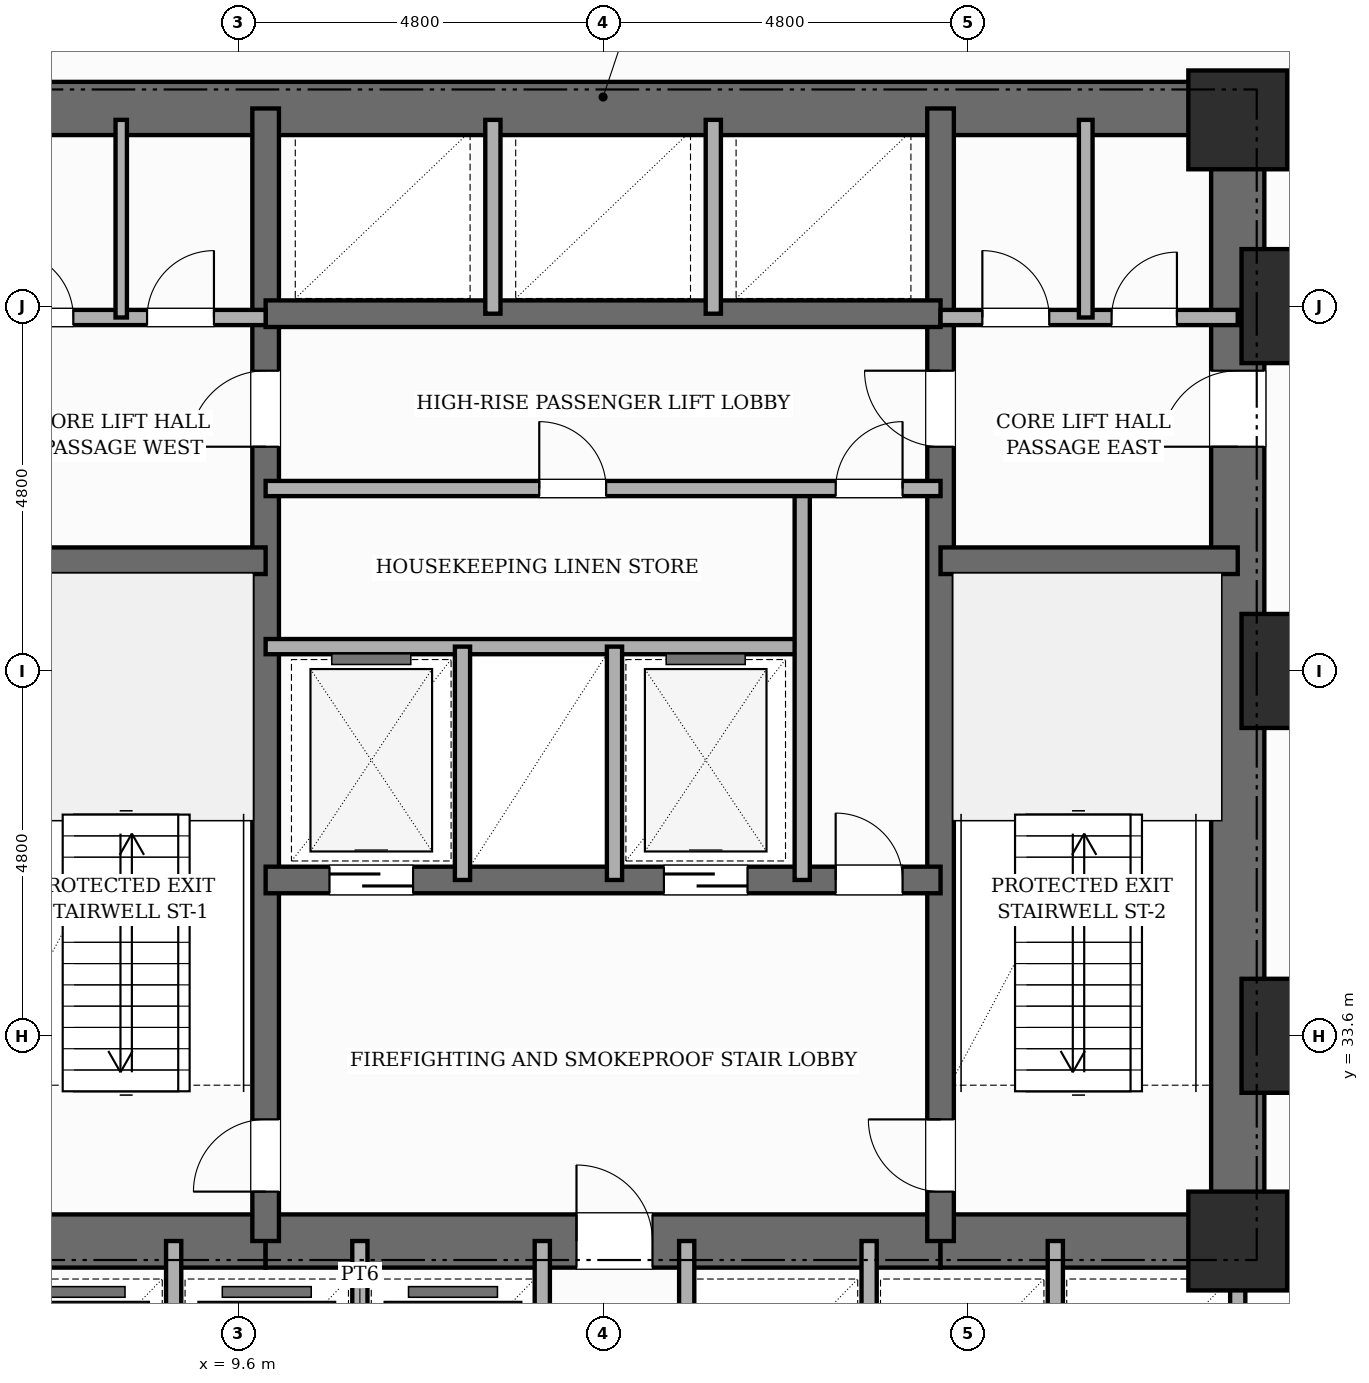
"""IFC4 building model, lengths in metres.
Left out: names, types, materials, properties, quantities, classifications, styles, units other than length and angle.
Written with IfcOpenShell. Run it as: python <this file> out.ifc"""

import sys

from ifc_helpers import new_model, si_unit, direction, frame, frame_2d, origin, origin_2d, place, context, subcontext, project, spatial, rectangle, extrude, element, fill, save


model = new_model("IFC4")
c1 = context("Model", 3, precision=1e-05, world=origin(), true_north=direction((0.0, 1.0)))
c2 = subcontext(c1, "Body", "Model", "MODEL_VIEW")
j1 = project(units=[si_unit("LENGTHUNIT", "METRE"), si_unit("PLANEANGLEUNIT", "RADIAN")], contexts=[c1])
p1 = place(None, origin())
s1 = spatial("IfcSite", under=j1, at=p1, CompositionType="ELEMENT")
p2 = place(p1, origin())
s2 = spatial("IfcBuilding", under=s1, at=p2, CompositionType="ELEMENT")
p3 = place(p2, frame((0.0, 0.0, 10.0)))
s3 = spatial("IfcBuildingStorey", under=s2, at=p3, CompositionType="ELEMENT", Elevation=10.0)
p4 = place(p3, frame((22.75, 30.55, 0.0), z_axis=(0.0, 0.0, 1.0), x_axis=(0.0, 1.0, 0.0)))
e1 = element("IfcWall", 1, at=p4, inside=s3, PredefinedType="SHEAR", context=c2, shape_type="SweptSolid", body=[
    extrude(rectangle(XDim=15.6, YDim=0.7, at=frame_2d((7.8, 0.0))), origin(), (0.0, 0.0, 1.0), 4.8),
])
p5 = place(p4, frame((10.8, 0.0, 0.0)))
e2 = element("IfcOpeningElement", 2, at=p5, cuts=e1, PredefinedType="OPENING", context=c2, shape_type="SweptSolid", body=[
    extrude(rectangle(XDim=1.0, YDim=2.15, at=frame_2d((0.5, 1.075))), frame((0.0, 0.36, 0.0), z_axis=(0.0, -1.0, 0.0), x_axis=(1.0, 0.0, 0.0)), (0.0, 0.0, 1.0), 0.72),
])
p6 = place(p3, frame((6.05, 45.8, 0.0), z_axis=(0.0, 0.0, 1.0), x_axis=(1.0, 0.0, 0.0)))
e3 = element("IfcWall", 3, at=p6, inside=s3, PredefinedType="SHEAR", context=c2, shape_type="SweptSolid", body=[
    extrude(rectangle(XDim=16.7, YDim=0.7, at=frame_2d((8.35, 0.0))), origin(), (0.0, 0.0, 1.0), 4.8),
])
p7 = place(p3, frame((6.05, 30.9, 0.0), z_axis=(0.0, 0.0, 1.0), x_axis=(1.0, 0.0, 0.0)))
e4 = element("IfcWall", 4, at=p7, inside=s3, PredefinedType="SHEAR", context=c2, shape_type="SweptSolid", body=[
    extrude(rectangle(XDim=3.91, YDim=0.7, at=frame_2d((1.955, 0.0))), origin(), (0.0, 0.0, 1.0), 4.8),
])
p8 = place(p3, frame((9.96, 30.9, 0.0), z_axis=(0.0, 0.0, 1.0), x_axis=(1.0, 0.0, 0.0)))
e5 = element("IfcWall", 5, at=p8, inside=s3, PredefinedType="SHEAR", context=c2, shape_type="SweptSolid", body=[
    extrude(rectangle(XDim=8.88, YDim=0.7, at=frame_2d((4.44, 0.0))), origin(), (0.0, 0.0, 1.0), 4.8),
])
p9 = place(p8, frame((4.09, 0.0, 0.0)))
e6 = element("IfcOpeningElement", 6, at=p9, cuts=e5, PredefinedType="OPENING", context=c2, shape_type="SweptSolid", body=[
    extrude(rectangle(XDim=1.0, YDim=2.15, at=frame_2d((0.5, 1.075))), frame((0.0, 0.36, 0.0), z_axis=(0.0, -1.0, 0.0), x_axis=(1.0, 0.0, 0.0)), (0.0, 0.0, 1.0), 0.72),
])
p10 = place(p3, frame((18.84, 30.9, 0.0), z_axis=(0.0, 0.0, 1.0), x_axis=(1.0, 0.0, 0.0)))
e7 = element("IfcWall", 7, at=p10, inside=s3, PredefinedType="SHEAR", context=c2, shape_type="SweptSolid", body=[
    extrude(rectangle(XDim=3.91, YDim=0.7, at=frame_2d((1.955, 0.0))), origin(), (0.0, 0.0, 1.0), 4.8),
])
p11 = place(p3, frame((9.96, 30.9, 0.0), z_axis=(0.0, 0.0, 1.0), x_axis=(0.0, 1.0, 0.0)))
e8 = element("IfcWall", 8, at=p11, inside=s3, PredefinedType="SHEAR", context=c2, shape_type="SweptSolid", body=[
    extrude(rectangle(XDim=14.9, YDim=0.35, at=frame_2d((7.45, 0.0))), origin(), (0.0, 0.0, 1.0), 4.8),
])
p12 = place(p11, frame((0.65, 0.0, 0.0)))
e9 = element("IfcOpeningElement", 9, at=p12, cuts=e8, PredefinedType="OPENING", context=c2, shape_type="SweptSolid", body=[
    extrude(rectangle(XDim=0.95, YDim=2.1, at=frame_2d((0.475, 1.05))), frame((0.0, 0.185, 0.0), z_axis=(0.0, -1.0, 0.0), x_axis=(1.0, 0.0, 0.0)), (0.0, 0.0, 1.0), 0.37),
])
p13 = place(p11, frame((10.45, 0.0, 0.0)))
e10 = element("IfcOpeningElement", 10, at=p13, cuts=e8, PredefinedType="OPENING", context=c2, shape_type="SweptSolid", body=[
    extrude(rectangle(XDim=1.0, YDim=2.15, at=frame_2d((0.5, 1.075))), frame((0.0, 0.185, 0.0), z_axis=(0.0, -1.0, 0.0), x_axis=(1.0, 0.0, 0.0)), (0.0, 0.0, 1.0), 0.37),
])
p14 = place(p3, frame((18.84, 30.9, 0.0), z_axis=(0.0, 0.0, 1.0), x_axis=(0.0, 1.0, 0.0)))
e11 = element("IfcWall", 11, at=p14, inside=s3, PredefinedType="SHEAR", context=c2, shape_type="SweptSolid", body=[
    extrude(rectangle(XDim=14.9, YDim=0.35, at=frame_2d((7.45, 0.0))), origin(), (0.0, 0.0, 1.0), 4.8),
])
p15 = place(p14, frame((0.65, 0.0, 0.0)))
e12 = element("IfcOpeningElement", 12, at=p15, cuts=e11, PredefinedType="OPENING", context=c2, shape_type="SweptSolid", body=[
    extrude(rectangle(XDim=0.95, YDim=2.1, at=frame_2d((0.475, 1.05))), frame((0.0, 0.185, 0.0), z_axis=(0.0, -1.0, 0.0), x_axis=(1.0, 0.0, 0.0)), (0.0, 0.0, 1.0), 0.37),
])
p16 = place(p14, frame((10.45, 0.0, 0.0)))
e13 = element("IfcOpeningElement", 13, at=p16, cuts=e11, PredefinedType="OPENING", context=c2, shape_type="SweptSolid", body=[
    extrude(rectangle(XDim=1.0, YDim=2.15, at=frame_2d((0.5, 1.075))), frame((0.0, 0.185, 0.0), z_axis=(0.0, -1.0, 0.0), x_axis=(1.0, 0.0, 0.0)), (0.0, 0.0, 1.0), 0.37),
])
for number, where, z_axis, x_axis in (
    (14, (6.05, 39.85, 0.0), (0.0, 0.0, 1.0), (1.0, 0.0, 0.0)),
    (15, (18.84, 39.85, 0.0), (0.0, 0.0, 1.0), (1.0, 0.0, 0.0)),
):
    element("IfcWall", number, at=place(p3, frame(where, z_axis=z_axis, x_axis=x_axis)), inside=s3, PredefinedType="SHEAR", context=c2, shape_type="SweptSolid", body=[
        extrude(rectangle(XDim=3.91, YDim=0.35, at=frame_2d((1.955, 0.0))), origin(), (0.0, 0.0, 1.0), 4.8),
    ])
p17 = place(p3, frame((9.96, 35.65, 0.0), z_axis=(0.0, 0.0, 1.0), x_axis=(1.0, 0.0, 0.0)))
e16 = element("IfcWall", 16, at=p17, inside=s3, PredefinedType="SHEAR", context=c2, shape_type="SweptSolid", body=[
    extrude(rectangle(XDim=8.88, YDim=0.35, at=frame_2d((4.44, 0.0))), origin(), (0.0, 0.0, 1.0), 4.8),
])
p18 = place(p17, frame((0.84, 0.0, 0.0)))
e17 = element("IfcOpeningElement", 17, at=p18, cuts=e16, PredefinedType="OPENING", context=c2, shape_type="SweptSolid", body=[
    extrude(rectangle(XDim=1.1, YDim=2.15, at=frame_2d((0.55, 1.075))), frame((0.0, 0.185, 0.0), z_axis=(0.0, -1.0, 0.0), x_axis=(1.0, 0.0, 0.0)), (0.0, 0.0, 1.0), 0.37),
])
p19 = place(p17, frame((5.24, 0.0, 0.0)))
e18 = element("IfcOpeningElement", 18, at=p19, cuts=e16, PredefinedType="OPENING", context=c2, shape_type="SweptSolid", body=[
    extrude(rectangle(XDim=1.1, YDim=2.15, at=frame_2d((0.55, 1.075))), frame((0.0, 0.185, 0.0), z_axis=(0.0, -1.0, 0.0), x_axis=(1.0, 0.0, 0.0)), (0.0, 0.0, 1.0), 0.37),
])
p20 = place(p17, frame((7.5, 0.0, 0.0)))
e19 = element("IfcOpeningElement", 19, at=p20, cuts=e16, PredefinedType="OPENING", context=c2, shape_type="SweptSolid", body=[
    extrude(rectangle(XDim=0.88, YDim=2.1, at=frame_2d((0.44, 1.05))), frame((0.0, 0.185, 0.0), z_axis=(0.0, -1.0, 0.0), x_axis=(1.0, 0.0, 0.0)), (0.0, 0.0, 1.0), 0.37),
])
p21 = place(p3, frame((9.96, 43.1, 0.0), z_axis=(0.0, 0.0, 1.0), x_axis=(1.0, 0.0, 0.0)))
e20 = element("IfcWall", 20, at=p21, inside=s3, PredefinedType="SHEAR", context=c2, shape_type="SweptSolid", body=[
    extrude(rectangle(XDim=8.88, YDim=0.35, at=frame_2d((4.44, 0.0))), origin(), (0.0, 0.0, 1.0), 4.8),
])
for number, where, z_axis, x_axis in (
    (21, (22.75, 30.9, 0.0), (0.0, 0.0, 1.0), (1.0, 0.0, 0.0)),
    (22, (22.75, 45.65, 0.0), (0.0, 0.0, 1.0), (1.0, 0.0, 0.0)),
):
    element("IfcColumn", number, at=place(p3, frame(where, z_axis=z_axis, x_axis=x_axis)), inside=s3, PredefinedType="COLUMN", context=c2, shape_type="SweptSolid", body=[
        extrude(rectangle(XDim=1.3, YDim=1.3, at=origin_2d()), origin(), (0.0, 0.0, 1.0), 4.8),
    ])
for number, where, z_axis, x_axis in (
    (23, (23.55, 33.6, 0.0), (0.0, 0.0, 1.0), (1.0, 0.0, 0.0)),
    (24, (23.55, 38.4, 0.0), (0.0, 0.0, 1.0), (1.0, 0.0, 0.0)),
    (25, (23.55, 43.2, 0.0), (0.0, 0.0, 1.0), (1.0, 0.0, 0.0)),
):
    element("IfcColumn", number, at=place(p3, frame(where, z_axis=z_axis, x_axis=x_axis)), inside=s3, PredefinedType="USERDEFINED", context=c2, shape_type="SweptSolid", body=[
        extrude(rectangle(XDim=1.5, YDim=1.5, at=origin_2d()), origin(), (0.0, 0.0, 1.0), 4.8),
    ])
p22 = place(p3, frame((9.96, 38.72, 0.0), z_axis=(0.0, 0.0, 1.0), x_axis=(1.0, 0.0, 0.0)))
e26 = element("IfcWall", 26, at=p22, inside=s3, PredefinedType="POLYGONAL", context=c2, shape_type="SweptSolid", body=[
    extrude(rectangle(XDim=7.06, YDim=0.2, at=frame_2d((3.53, 0.0))), origin(), (0.0, 0.0, 1.0), 4.4),
])
for number, where, z_axis, x_axis in (
    (27, (12.55, 35.65, 0.0), (0.0, 0.0, 1.0), (0.0, 1.0, 0.0)),
    (28, (14.55, 35.65, 0.0), (0.0, 0.0, 1.0), (0.0, 1.0, 0.0)),
):
    element("IfcWall", number, at=place(p3, frame(where, z_axis=z_axis, x_axis=x_axis)), inside=s3, PredefinedType="POLYGONAL", context=c2, shape_type="SweptSolid", body=[
        extrude(rectangle(XDim=3.07, YDim=0.2, at=frame_2d((1.535, 0.0))), origin(), (0.0, 0.0, 1.0), 4.4),
    ])
p23 = place(p3, frame((17.02, 35.65, 0.0), z_axis=(0.0, 0.0, 1.0), x_axis=(0.0, 1.0, 0.0)))
e29 = element("IfcWall", 29, at=p23, inside=s3, PredefinedType="POLYGONAL", context=c2, shape_type="SweptSolid", body=[
    extrude(rectangle(XDim=5.15, YDim=0.2, at=frame_2d((2.575, 0.0))), origin(), (0.0, 0.0, 1.0), 4.4),
])
p24 = place(p3, frame((9.96, 40.8, 0.0), z_axis=(0.0, 0.0, 1.0), x_axis=(1.0, 0.0, 0.0)))
e30 = element("IfcWall", 30, at=p24, inside=s3, PredefinedType="POLYGONAL", context=c2, shape_type="SweptSolid", body=[
    extrude(rectangle(XDim=8.88, YDim=0.2, at=frame_2d((4.44, 0.0))), origin(), (0.0, 0.0, 1.0), 4.4),
])
p25 = place(p24, frame((7.5, 0.0, 0.0)))
e31 = element("IfcOpeningElement", 31, at=p25, cuts=e30, PredefinedType="OPENING", context=c2, shape_type="SweptSolid", body=[
    extrude(rectangle(XDim=0.88, YDim=2.1, at=frame_2d((0.44, 1.05))), frame((0.0, 0.11, 0.0), z_axis=(0.0, -1.0, 0.0), x_axis=(1.0, 0.0, 0.0)), (0.0, 0.0, 1.0), 0.22),
])
p26 = place(p24, frame((3.6, 0.0, 0.0)))
e32 = element("IfcOpeningElement", 32, at=p26, cuts=e30, PredefinedType="OPENING", context=c2, shape_type="SweptSolid", body=[
    extrude(rectangle(XDim=0.88, YDim=2.1, at=frame_2d((0.44, 1.05))), frame((0.0, 0.11, 0.0), z_axis=(0.0, -1.0, 0.0), x_axis=(1.0, 0.0, 0.0)), (0.0, 0.0, 1.0), 0.22),
])
p27 = place(p3, frame((18.84, 43.05, 0.0), z_axis=(0.0, 0.0, 1.0), x_axis=(1.0, 0.0, 0.0)))
e33 = element("IfcWall", 33, at=p27, inside=s3, PredefinedType="POLYGONAL", context=c2, shape_type="SweptSolid", body=[
    extrude(rectangle(XDim=3.91, YDim=0.2, at=frame_2d((1.955, 0.0))), origin(), (0.0, 0.0, 1.0), 3.48),
])
p28 = place(p27, frame((0.55, 0.0, 0.0)))
e34 = element("IfcOpeningElement", 34, at=p28, cuts=e33, PredefinedType="OPENING", context=c2, shape_type="SweptSolid", body=[
    extrude(rectangle(XDim=0.88, YDim=2.1, at=frame_2d((0.44, 1.05))), frame((0.0, 0.11, 0.0), z_axis=(0.0, -1.0, 0.0), x_axis=(1.0, 0.0, 0.0)), (0.0, 0.0, 1.0), 0.22),
])
p29 = place(p27, frame((2.25, 0.0, 0.0)))
e35 = element("IfcOpeningElement", 35, at=p29, cuts=e33, PredefinedType="OPENING", context=c2, shape_type="SweptSolid", body=[
    extrude(rectangle(XDim=0.86, YDim=2.1, at=frame_2d((0.43, 1.05))), frame((0.0, 0.11, 0.0), z_axis=(0.0, -1.0, 0.0), x_axis=(1.0, 0.0, 0.0)), (0.0, 0.0, 1.0), 0.22),
])
p30 = place(p3, frame((6.05, 43.05, 0.0), z_axis=(0.0, 0.0, 1.0), x_axis=(1.0, 0.0, 0.0)))
e36 = element("IfcWall", 36, at=p30, inside=s3, PredefinedType="POLYGONAL", context=c2, shape_type="SweptSolid", body=[
    extrude(rectangle(XDim=3.91, YDim=0.2, at=frame_2d((1.955, 0.0))), origin(), (0.0, 0.0, 1.0), 3.48),
])
p31 = place(p30, frame((0.5, 0.0, 0.0)))
e37 = element("IfcOpeningElement", 37, at=p31, cuts=e36, PredefinedType="OPENING", context=c2, shape_type="SweptSolid", body=[
    extrude(rectangle(XDim=0.88, YDim=2.1, at=frame_2d((0.44, 1.05))), frame((0.0, 0.11, 0.0), z_axis=(0.0, -1.0, 0.0), x_axis=(1.0, 0.0, 0.0)), (0.0, 0.0, 1.0), 0.22),
])
p32 = place(p30, frame((2.35, 0.0, 0.0)))
e38 = element("IfcOpeningElement", 38, at=p32, cuts=e36, PredefinedType="OPENING", context=c2, shape_type="SweptSolid", body=[
    extrude(rectangle(XDim=0.88, YDim=2.1, at=frame_2d((0.44, 1.05))), frame((0.0, 0.11, 0.0), z_axis=(0.0, -1.0, 0.0), x_axis=(1.0, 0.0, 0.0)), (0.0, 0.0, 1.0), 0.22),
])
for number, where, z_axis, x_axis in (
    (39, (12.95, 43.1, 0.0), (0.0, 0.0, 1.0), (0.0, 1.0, 0.0)),
    (40, (15.85, 43.1, 0.0), (0.0, 0.0, 1.0), (0.0, 1.0, 0.0)),
):
    element("IfcWall", number, at=place(p3, frame(where, z_axis=z_axis, x_axis=x_axis)), inside=s3, PredefinedType="POLYGONAL", context=c2, shape_type="SweptSolid", body=[
        extrude(rectangle(XDim=2.55, YDim=0.2, at=frame_2d((1.275, 0.0))), origin(), (0.0, 0.0, 1.0), 4.4),
    ])
p33 = place(p3, frame((8.06, 43.05, 0.0), z_axis=(0.0, 0.0, 1.0), x_axis=(0.0, 1.0, 0.0)))
e41 = element("IfcWall", 41, at=p33, inside=s3, PredefinedType="PARTITIONING", context=c2, shape_type="SweptSolid", body=[
    extrude(rectangle(XDim=2.6, YDim=0.15, at=frame_2d((1.3, 0.0))), origin(), (0.0, 0.0, 1.0), 4.4),
])
p34 = place(p3, frame((20.75, 43.05, 0.0), z_axis=(0.0, 0.0, 1.0), x_axis=(0.0, 1.0, 0.0)))
e42 = element("IfcWall", 42, at=p34, inside=s3, PredefinedType="PLUMBINGWALL", context=c2, shape_type="SweptSolid", body=[
    extrude(rectangle(XDim=2.6, YDim=0.18, at=frame_2d((1.3, 0.0))), origin(), (0.0, 0.0, 1.0), 4.4),
])
p35 = place(p3, frame((22.75, 27.9, 0.0), z_axis=(0.0, 0.0, 1.0), x_axis=(0.0, 1.0, 0.0)))
e43 = element("IfcWall", 43, at=p35, inside=s3, PredefinedType="POLYGONAL", context=c2, shape_type="SweptSolid", body=[
    extrude(rectangle(XDim=3.0, YDim=0.2, at=frame_2d((1.5, 0.0))), origin(), (0.0, 0.0, 1.0), 4.4),
])
for number, where, z_axis, x_axis in (
    (44, (13.6, 28.0, 0.0), (0.0, 0.0, 1.0), (0.0, 1.0, 0.0)),
    (45, (15.5, 28.0, 0.0), (0.0, 0.0, 1.0), (0.0, 1.0, 0.0)),
    (46, (8.75, 28.0, 0.0), (0.0, 0.0, 1.0), (0.0, 1.0, 0.0)),
    (47, (11.2, 28.0, 0.0), (0.0, 0.0, 1.0), (0.0, 1.0, 0.0)),
    (48, (17.9, 28.0, 0.0), (0.0, 0.0, 1.0), (0.0, 1.0, 0.0)),
    (49, (20.35, 28.0, 0.0), (0.0, 0.0, 1.0), (0.0, 1.0, 0.0)),
):
    element("IfcWall", number, at=place(p3, frame(where, z_axis=z_axis, x_axis=x_axis)), inside=s3, PredefinedType="POLYGONAL", context=c2, shape_type="SweptSolid", body=[
        extrude(rectangle(XDim=2.9, YDim=0.2, at=frame_2d((1.45, 0.0))), origin(), (0.0, 0.0, 1.0), 4.4),
    ])
p36 = place(p12, origin())
e50 = element("IfcDoor", 50, at=p36, inside=s3, OperationType="SINGLE_SWING_LEFT", PredefinedType="DOOR", context=c2, shape_type="SweptSolid", body=[
    extrude(rectangle(XDim=0.95, YDim=2.1, at=frame_2d((0.475, 1.05))), frame((0.0, 0.025, 0.0), z_axis=(0.0, -1.0, 0.0), x_axis=(1.0, 0.0, 0.0)), (0.0, 0.0, 1.0), 0.05),
])
fill(e9, e50)
p37 = place(p15, origin())
e51 = element("IfcDoor", 51, at=p37, inside=s3, OperationType="SINGLE_SWING_RIGHT", PredefinedType="DOOR", context=c2, shape_type="SweptSolid", body=[
    extrude(rectangle(XDim=0.95, YDim=2.1, at=frame_2d((0.475, 1.05))), frame((0.0, 0.025, 0.0), z_axis=(0.0, -1.0, 0.0), x_axis=(1.0, 0.0, 0.0)), (0.0, 0.0, 1.0), 0.05),
])
fill(e12, e51)
p38 = place(p9, origin())
e52 = element("IfcDoor", 52, at=p38, inside=s3, OperationType="SINGLE_SWING_LEFT", PredefinedType="DOOR", context=c2, shape_type="SweptSolid", body=[
    extrude(rectangle(XDim=1.0, YDim=2.15, at=frame_2d((0.5, 1.075))), frame((0.0, 0.025, 0.0), z_axis=(0.0, -1.0, 0.0), x_axis=(1.0, 0.0, 0.0)), (0.0, 0.0, 1.0), 0.05),
])
fill(e6, e52)
p39 = place(p18, origin())
e53 = element("IfcDoor", 53, at=p39, inside=s3, OperationType="SLIDING_TO_LEFT", PredefinedType="DOOR", context=c2, shape_type="SweptSolid", body=[
    extrude(rectangle(XDim=1.1, YDim=2.15, at=frame_2d((0.55, 1.075))), frame((0.0, 0.025, 0.0), z_axis=(0.0, -1.0, 0.0), x_axis=(1.0, 0.0, 0.0)), (0.0, 0.0, 1.0), 0.05),
])
fill(e17, e53)
p40 = place(p19, origin())
e54 = element("IfcDoor", 54, at=p40, inside=s3, OperationType="SLIDING_TO_RIGHT", PredefinedType="DOOR", context=c2, shape_type="SweptSolid", body=[
    extrude(rectangle(XDim=1.1, YDim=2.15, at=frame_2d((0.55, 1.075))), frame((0.0, 0.025, 0.0), z_axis=(0.0, -1.0, 0.0), x_axis=(1.0, 0.0, 0.0)), (0.0, 0.0, 1.0), 0.05),
])
fill(e18, e54)
p41 = place(p20, origin())
e55 = element("IfcDoor", 55, at=p41, inside=s3, OperationType="SINGLE_SWING_LEFT", PredefinedType="DOOR", context=c2, shape_type="SweptSolid", body=[
    extrude(rectangle(XDim=0.88, YDim=2.1, at=frame_2d((0.44, 1.05))), frame((0.0, 0.025, 0.0), z_axis=(0.0, -1.0, 0.0), x_axis=(1.0, 0.0, 0.0)), (0.0, 0.0, 1.0), 0.05),
])
fill(e19, e55)
p42 = place(p25, origin())
e56 = element("IfcDoor", 56, at=p42, inside=s3, OperationType="SINGLE_SWING_RIGHT", PredefinedType="DOOR", context=c2, shape_type="SweptSolid", body=[
    extrude(rectangle(XDim=0.88, YDim=2.1, at=frame_2d((0.44, 1.05))), frame((0.0, 0.025, 0.0), z_axis=(0.0, -1.0, 0.0), x_axis=(1.0, 0.0, 0.0)), (0.0, 0.0, 1.0), 0.05),
])
fill(e31, e56)
p43 = place(p13, origin())
e57 = element("IfcDoor", 57, at=p43, inside=s3, OperationType="SINGLE_SWING_LEFT", PredefinedType="DOOR", context=c2, shape_type="SweptSolid", body=[
    extrude(rectangle(XDim=1.0, YDim=2.15, at=frame_2d((0.5, 1.075))), frame((0.0, 0.025, 0.0), z_axis=(0.0, -1.0, 0.0), x_axis=(1.0, 0.0, 0.0)), (0.0, 0.0, 1.0), 0.05),
])
fill(e10, e57)
p44 = place(p16, origin())
e58 = element("IfcDoor", 58, at=p44, inside=s3, OperationType="SINGLE_SWING_RIGHT", PredefinedType="DOOR", context=c2, shape_type="SweptSolid", body=[
    extrude(rectangle(XDim=1.0, YDim=2.15, at=frame_2d((0.5, 1.075))), frame((0.0, 0.025, 0.0), z_axis=(0.0, -1.0, 0.0), x_axis=(1.0, 0.0, 0.0)), (0.0, 0.0, 1.0), 0.05),
])
fill(e13, e58)
p45 = place(p5, origin())
e59 = element("IfcDoor", 59, at=p45, inside=s3, OperationType="SINGLE_SWING_LEFT", PredefinedType="DOOR", context=c2, shape_type="SweptSolid", body=[
    extrude(rectangle(XDim=1.0, YDim=2.15, at=frame_2d((0.5, 1.075))), frame((0.0, 0.025, 0.0), z_axis=(0.0, -1.0, 0.0), x_axis=(1.0, 0.0, 0.0)), (0.0, 0.0, 1.0), 0.05),
])
fill(e2, e59)
p46 = place(p31, origin())
e60 = element("IfcDoor", 60, at=p46, inside=s3, OperationType="SINGLE_SWING_LEFT", PredefinedType="DOOR", context=c2, shape_type="SweptSolid", body=[
    extrude(rectangle(XDim=0.88, YDim=2.1, at=frame_2d((0.44, 1.05))), frame((0.0, 0.025, 0.0), z_axis=(0.0, -1.0, 0.0), x_axis=(1.0, 0.0, 0.0)), (0.0, 0.0, 1.0), 0.05),
])
fill(e37, e60)
p47 = place(p32, origin())
e61 = element("IfcDoor", 61, at=p47, inside=s3, OperationType="SINGLE_SWING_RIGHT", PredefinedType="DOOR", context=c2, shape_type="SweptSolid", body=[
    extrude(rectangle(XDim=0.88, YDim=2.1, at=frame_2d((0.44, 1.05))), frame((0.0, 0.025, 0.0), z_axis=(0.0, -1.0, 0.0), x_axis=(1.0, 0.0, 0.0)), (0.0, 0.0, 1.0), 0.05),
])
fill(e38, e61)
p48 = place(p26, origin())
e62 = element("IfcDoor", 62, at=p48, inside=s3, OperationType="SINGLE_SWING_LEFT", PredefinedType="DOOR", context=c2, shape_type="SweptSolid", body=[
    extrude(rectangle(XDim=0.88, YDim=2.1, at=frame_2d((0.44, 1.05))), frame((0.0, 0.025, 0.0), z_axis=(0.0, -1.0, 0.0), x_axis=(1.0, 0.0, 0.0)), (0.0, 0.0, 1.0), 0.05),
])
fill(e32, e62)
p49 = place(p28, origin())
e63 = element("IfcDoor", 63, at=p49, inside=s3, OperationType="SINGLE_SWING_LEFT", PredefinedType="DOOR", context=c2, shape_type="SweptSolid", body=[
    extrude(rectangle(XDim=0.88, YDim=2.1, at=frame_2d((0.44, 1.05))), frame((0.0, 0.025, 0.0), z_axis=(0.0, -1.0, 0.0), x_axis=(1.0, 0.0, 0.0)), (0.0, 0.0, 1.0), 0.05),
])
fill(e34, e63)
p50 = place(p29, origin())
e64 = element("IfcDoor", 64, at=p50, inside=s3, OperationType="SINGLE_SWING_RIGHT", PredefinedType="DOOR", context=c2, shape_type="SweptSolid", body=[
    extrude(rectangle(XDim=0.86, YDim=2.1, at=frame_2d((0.43, 1.05))), frame((0.0, 0.025, 0.0), z_axis=(0.0, -1.0, 0.0), x_axis=(1.0, 0.0, 0.0)), (0.0, 0.0, 1.0), 0.05),
])
fill(e35, e64)
save(model, sys.argv[1])
